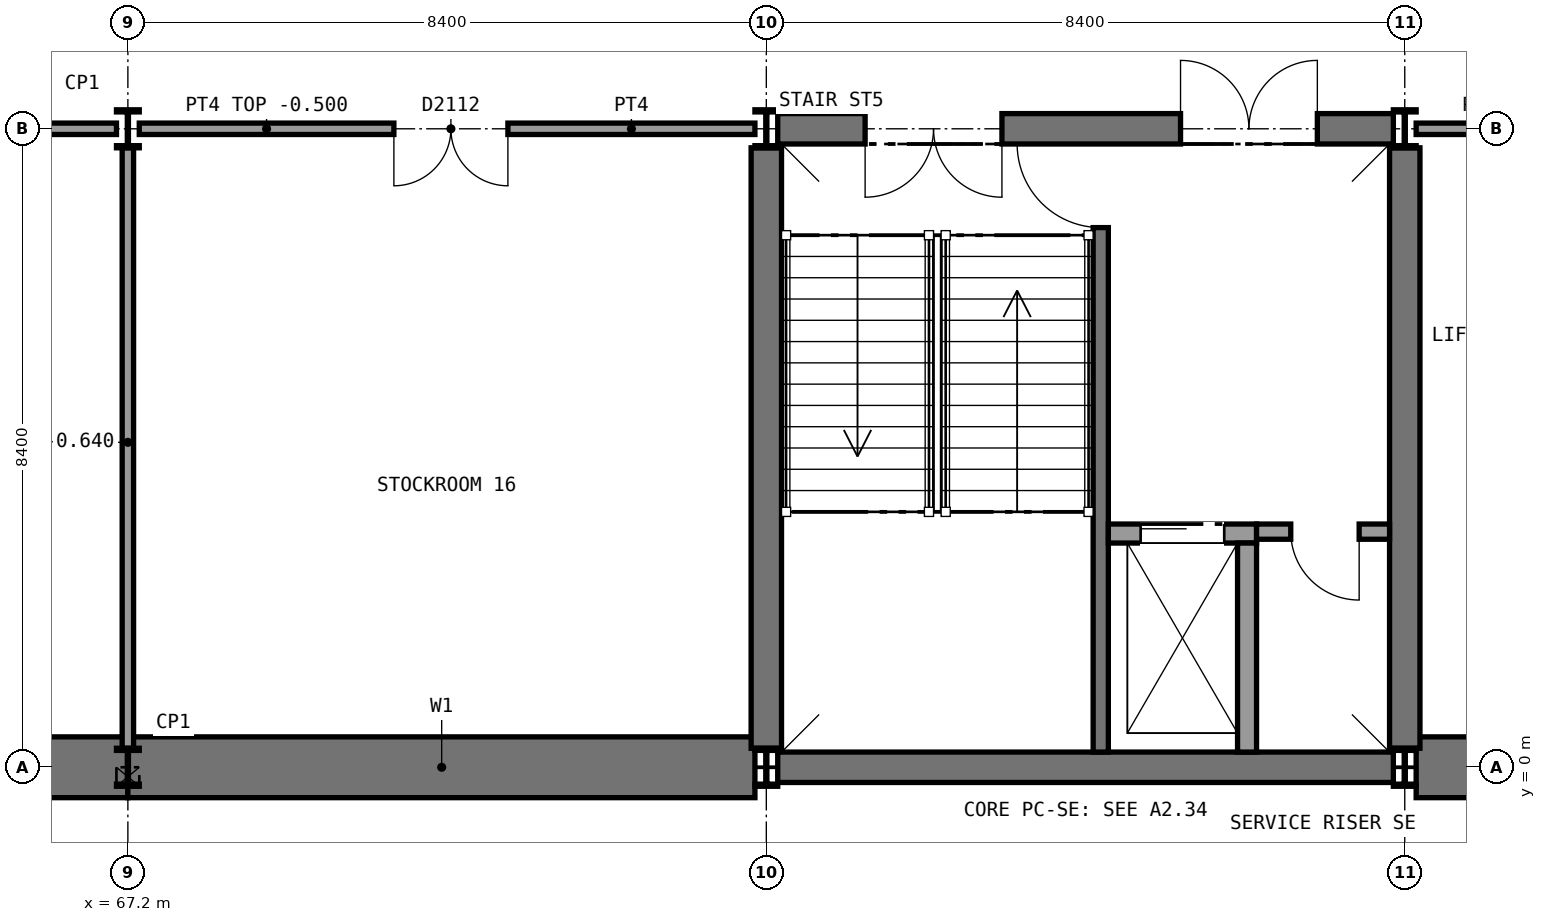
"""IFC4 building model, lengths in metres.
Left out: names, types, materials, properties, quantities, classifications, styles, units other than length and angle.
Written with IfcOpenShell. Run it as: python <this file> out.ifc"""

import sys

from ifc_helpers import new_model, si_unit, direction, frame, frame_2d, origin, origin_2d, place, context, subcontext, project, spatial, rectangle, i_section, extrude, element, fill, save


model = new_model("IFC4")
c1 = context("Model", 3, precision=1e-05, world=origin(), true_north=direction((0.0, 1.0)))
c2 = subcontext(c1, "Body", "Model", "MODEL_VIEW")
j1 = project(units=[si_unit("LENGTHUNIT", "METRE"), si_unit("PLANEANGLEUNIT", "RADIAN")], contexts=[c1])
p1 = place(None, origin())
s1 = spatial("IfcSite", under=j1, at=p1, CompositionType="ELEMENT")
p2 = place(p1, origin())
s2 = spatial("IfcBuilding", under=s1, at=p2, CompositionType="ELEMENT")
p3 = place(p2, frame((0.0, 0.0, -4.9)))
s3 = spatial("IfcBuildingStorey", under=s2, at=p3, CompositionType="ELEMENT", Elevation=-4.9)
p4 = place(p3, frame((58.95, 0.0, 0.0), z_axis=(0.0, 0.0, 1.0), x_axis=(1.0, 0.0, 0.0)))
e1 = element("IfcWall", 1, at=p4, inside=s3, PredefinedType="SOLIDWALL", context=c2, shape_type="SweptSolid", body=[
    extrude(rectangle(XDim=8.25, YDim=0.8, at=frame_2d((4.125, 0.0))), origin(), (0.0, 0.0, 1.0), 4.75),
])
p5 = place(p3, frame((67.2, 0.0, 0.0), z_axis=(0.0, 0.0, 1.0), x_axis=(1.0, 0.0, 0.0)))
e2 = element("IfcWall", 2, at=p5, inside=s3, PredefinedType="SOLIDWALL", context=c2, shape_type="SweptSolid", body=[
    extrude(rectangle(XDim=8.25, YDim=0.8, at=frame_2d((4.125, 0.0))), origin(), (0.0, 0.0, 1.0), 4.75),
])
p6 = place(p3, frame((84.15, 0.0, 0.0), z_axis=(0.0, 0.0, 1.0), x_axis=(1.0, 0.0, 0.0)))
e3 = element("IfcWall", 3, at=p6, inside=s3, PredefinedType="SOLIDWALL", context=c2, shape_type="SweptSolid", body=[
    extrude(rectangle(XDim=8.25, YDim=0.8, at=frame_2d((4.125, 0.0))), origin(), (0.0, 0.0, 1.0), 4.75),
])
p7 = place(p3, frame((75.75, 0.0, 0.0), z_axis=(0.0, 0.0, 1.0), x_axis=(1.0, 0.0, 0.0)))
e4 = element("IfcWall", 4, at=p7, inside=s3, PredefinedType="SHEAR", context=c2, shape_type="SweptSolid", body=[
    extrude(rectangle(XDim=8.1, YDim=0.4, at=frame_2d((4.05, 0.0))), origin(), (0.0, 0.0, 1.0), 4.75),
])
p8 = place(p3, frame((75.75, 8.4, 0.0), z_axis=(0.0, 0.0, 1.0), x_axis=(1.0, 0.0, 0.0)))
e5 = element("IfcWall", 5, at=p8, inside=s3, PredefinedType="SHEAR", context=c2, shape_type="SweptSolid", body=[
    extrude(rectangle(XDim=8.1, YDim=0.4, at=frame_2d((4.05, 0.0))), origin(), (0.0, 0.0, 1.0), 4.75),
])
p9 = place(p8, frame((1.15, 0.0, 0.0)))
e6 = element("IfcOpeningElement", 6, at=p9, cuts=e5, PredefinedType="OPENING", context=c2, shape_type="SweptSolid", body=[
    extrude(rectangle(XDim=1.8, YDim=2.1, at=frame_2d((0.9, 1.05))), frame((0.0, 0.21, 0.0), z_axis=(0.0, -1.0, 0.0), x_axis=(1.0, 0.0, 0.0)), (0.0, 0.0, 1.0), 0.42),
])
p10 = place(p8, frame((5.3, 0.0, 0.0)))
e7 = element("IfcOpeningElement", 7, at=p10, cuts=e5, PredefinedType="OPENING", context=c2, shape_type="SweptSolid", body=[
    extrude(rectangle(XDim=1.8, YDim=2.1, at=frame_2d((0.9, 1.05))), frame((0.0, 0.21, 0.0), z_axis=(0.0, -1.0, 0.0), x_axis=(1.0, 0.0, 0.0)), (0.0, 0.0, 1.0), 0.42),
])
for number, where, z_axis, x_axis in (
    (8, (75.6, 0.25, 0.0), (0.0, 0.0, 1.0), (0.0, 1.0, 0.0)),
    (9, (84.0, 0.25, 0.0), (0.0, 0.0, 1.0), (0.0, 1.0, 0.0)),
):
    element("IfcWall", number, at=place(p3, frame(where, z_axis=z_axis, x_axis=x_axis)), inside=s3, PredefinedType="SHEAR", context=c2, shape_type="SweptSolid", body=[
        extrude(rectangle(XDim=7.9, YDim=0.4, at=frame_2d((3.95, 0.0))), origin(), (0.0, 0.0, 1.0), 4.75),
    ])
for number, where, z_axis, x_axis in (
    (10, (67.2, 0.0, 0.0), (0.0, 0.0, 1.0), (1.0, 0.0, 0.0)),
    (11, (67.2, 8.4, 0.0), (0.0, 0.0, 1.0), (1.0, 0.0, 0.0)),
    (12, (75.6, 0.0, 0.0), (0.0, 0.0, 1.0), (1.0, 0.0, 0.0)),
    (13, (75.6, 8.4, 0.0), (0.0, 0.0, 1.0), (1.0, 0.0, 0.0)),
    (14, (84.0, 0.0, 0.0), (0.0, 0.0, 1.0), (1.0, 0.0, 0.0)),
    (15, (84.0, 8.4, 0.0), (0.0, 0.0, 1.0), (1.0, 0.0, 0.0)),
):
    element("IfcColumn", number, at=place(p3, frame(where, z_axis=z_axis, x_axis=x_axis)), inside=s3, PredefinedType="COLUMN", context=c2, shape_type="SweptSolid", body=[
        extrude(i_section(OverallWidth=0.3, OverallDepth=0.5, WebThickness=0.014, FlangeThickness=0.028, FilletRadius=0.027, at=origin_2d()), origin(), (0.0, 0.0, 1.0), 4.9),
    ])
p11 = place(p3, frame((58.95, 8.4, 0.0), z_axis=(0.0, 0.0, 1.0), x_axis=(1.0, 0.0, 0.0)))
e16 = element("IfcWall", 16, at=p11, inside=s3, PredefinedType="SOLIDWALL", context=c2, shape_type="SweptSolid", body=[
    extrude(rectangle(XDim=8.1, YDim=0.15, at=frame_2d((4.05, 0.0))), origin(), (0.0, 0.0, 1.0), 4.4),
])
p12 = place(p11, frame((3.35, 0.0, 0.0)))
e17 = element("IfcOpeningElement", 17, at=p12, cuts=e16, PredefinedType="OPENING", context=c2, shape_type="SweptSolid", body=[
    extrude(rectangle(XDim=1.5, YDim=2.1, at=frame_2d((0.75, 1.05))), frame((0.0, 0.085, 0.0), z_axis=(0.0, -1.0, 0.0), x_axis=(1.0, 0.0, 0.0)), (0.0, 0.0, 1.0), 0.17),
])
p13 = place(p3, frame((67.35, 8.4, 0.0), z_axis=(0.0, 0.0, 1.0), x_axis=(1.0, 0.0, 0.0)))
e18 = element("IfcWall", 18, at=p13, inside=s3, PredefinedType="SOLIDWALL", context=c2, shape_type="SweptSolid", body=[
    extrude(rectangle(XDim=8.1, YDim=0.15, at=frame_2d((4.05, 0.0))), origin(), (0.0, 0.0, 1.0), 4.4),
])
p14 = place(p13, frame((3.35, 0.0, 0.0)))
e19 = element("IfcOpeningElement", 19, at=p14, cuts=e18, PredefinedType="OPENING", context=c2, shape_type="SweptSolid", body=[
    extrude(rectangle(XDim=1.5, YDim=2.1, at=frame_2d((0.75, 1.05))), frame((0.0, 0.085, 0.0), z_axis=(0.0, -1.0, 0.0), x_axis=(1.0, 0.0, 0.0)), (0.0, 0.0, 1.0), 0.17),
])
p15 = place(p3, frame((84.15, 8.4, 0.0), z_axis=(0.0, 0.0, 1.0), x_axis=(1.0, 0.0, 0.0)))
e20 = element("IfcWall", 20, at=p15, inside=s3, PredefinedType="SOLIDWALL", context=c2, shape_type="SweptSolid", body=[
    extrude(rectangle(XDim=8.1, YDim=0.15, at=frame_2d((4.05, 0.0))), origin(), (0.0, 0.0, 1.0), 4.4),
])
p16 = place(p15, frame((3.35, 0.0, 0.0)))
e21 = element("IfcOpeningElement", 21, at=p16, cuts=e20, PredefinedType="OPENING", context=c2, shape_type="SweptSolid", body=[
    extrude(rectangle(XDim=1.5, YDim=2.1, at=frame_2d((0.75, 1.05))), frame((0.0, 0.085, 0.0), z_axis=(0.0, -1.0, 0.0), x_axis=(1.0, 0.0, 0.0)), (0.0, 0.0, 1.0), 0.17),
])
p17 = place(p3, frame((67.2, 0.25, 0.0), z_axis=(0.0, 0.0, 1.0), x_axis=(0.0, 1.0, 0.0)))
e22 = element("IfcWall", 22, at=p17, inside=s3, PredefinedType="SOLIDWALL", context=c2, shape_type="SweptSolid", body=[
    extrude(rectangle(XDim=7.9, YDim=0.15, at=frame_2d((3.95, 0.0))), origin(), (0.0, 0.0, 1.0), 4.26),
])
p18 = place(p3, frame((80.0, 0.2, 0.0), z_axis=(0.0, 0.0, 1.0), x_axis=(0.0, 1.0, 0.0)))
e23 = element("IfcWall", 23, at=p18, inside=s3, PredefinedType="SHEAR", context=c2, shape_type="SweptSolid", body=[
    extrude(rectangle(XDim=8.0, YDim=0.2, at=frame_2d((4.0, 0.0))), origin(), (0.0, 0.0, 1.0), 4.75),
])
p19 = place(p18, frame((6.9, 0.0, 0.0)))
e24 = element("IfcOpeningElement", 24, at=p19, cuts=e23, PredefinedType="OPENING", context=c2, shape_type="SweptSolid", body=[
    extrude(rectangle(XDim=1.11, YDim=2.1, at=frame_2d((0.555, 1.05))), frame((0.0, 0.11, 0.0), z_axis=(0.0, -1.0, 0.0), x_axis=(1.0, 0.0, 0.0)), (0.0, 0.0, 1.0), 0.22),
])
p20 = place(p3, frame((80.1, 3.075, 0.0), z_axis=(0.0, 0.0, 1.0), x_axis=(1.0, 0.0, 0.0)))
e25 = element("IfcWall", 25, at=p20, inside=s3, PredefinedType="SOLIDWALL", context=c2, shape_type="SweptSolid", body=[
    extrude(rectangle(XDim=1.95, YDim=0.25, at=frame_2d((0.975, 0.0))), origin(), (0.0, 0.0, 1.0), 4.9),
])
p21 = place(p20, frame((0.425, 0.0, 0.0)))
e26 = element("IfcOpeningElement", 26, at=p21, cuts=e25, PredefinedType="OPENING", context=c2, shape_type="SweptSolid", body=[
    extrude(rectangle(XDim=1.1, YDim=2.1, at=frame_2d((0.55, 1.05))), frame((0.0, 0.135, 0.0), z_axis=(0.0, -1.0, 0.0), x_axis=(1.0, 0.0, 0.0)), (0.0, 0.0, 1.0), 0.27),
])
p22 = place(p3, frame((81.925, 0.2, 0.0), z_axis=(0.0, 0.0, 1.0), x_axis=(0.0, 1.0, 0.0)))
e27 = element("IfcWall", 27, at=p22, inside=s3, PredefinedType="SOLIDWALL", context=c2, shape_type="SweptSolid", body=[
    extrude(rectangle(XDim=2.75, YDim=0.25, at=frame_2d((1.375, 0.0))), origin(), (0.0, 0.0, 1.0), 4.9),
])
p23 = place(p3, frame((82.05, 3.1, 0.0), z_axis=(0.0, 0.0, 1.0), x_axis=(1.0, 0.0, 0.0)))
e28 = element("IfcWall", 28, at=p23, inside=s3, PredefinedType="PARTITIONING", context=c2, shape_type="SweptSolid", body=[
    extrude(rectangle(XDim=1.75, YDim=0.2, at=frame_2d((0.875, 0.0))), origin(), (0.0, 0.0, 1.0), 4.75),
])
p24 = place(p23, frame((0.45, 0.0, 0.0)))
e29 = element("IfcOpeningElement", 29, at=p24, cuts=e28, PredefinedType="OPENING", context=c2, shape_type="SweptSolid", body=[
    extrude(rectangle(XDim=0.9, YDim=2.1, at=frame_2d((0.45, 1.05))), frame((0.0, 0.11, 0.0), z_axis=(0.0, -1.0, 0.0), x_axis=(1.0, 0.0, 0.0)), (0.0, 0.0, 1.0), 0.22),
])
p25 = place(p14, frame((1.5, 0.0, 0.0), z_axis=(0.0, 0.0, 1.0), x_axis=(-1.0, 0.0, 0.0)))
e30 = element("IfcDoor", 30, at=p25, inside=s3, OperationType="DOUBLE_DOOR_SINGLE_SWING", PredefinedType="DOOR", context=c2, shape_type="SweptSolid", body=[
    extrude(rectangle(XDim=1.5, YDim=2.1, at=frame_2d((0.75, 1.05))), frame((0.0, 0.025, 0.0), z_axis=(0.0, -1.0, 0.0), x_axis=(1.0, 0.0, 0.0)), (0.0, 0.0, 1.0), 0.05),
])
fill(e19, e30)
p26 = place(p19, origin())
e31 = element("IfcDoor", 31, at=p26, inside=s3, OperationType="SINGLE_SWING_RIGHT", PredefinedType="DOOR", context=c2, shape_type="SweptSolid", body=[
    extrude(rectangle(XDim=1.1, YDim=2.1, at=frame_2d((0.55, 1.05))), frame((0.0, 0.025, 0.0), z_axis=(0.0, -1.0, 0.0), x_axis=(1.0, 0.0, 0.0)), (0.0, 0.0, 1.0), 0.05),
])
fill(e24, e31)
p27 = place(p21, origin())
e32 = element("IfcDoor", 32, at=p27, inside=s3, OperationType="SLIDING_TO_LEFT", PredefinedType="DOOR", context=c2, shape_type="SweptSolid", body=[
    extrude(rectangle(XDim=1.1, YDim=2.1, at=frame_2d((0.55, 1.05))), frame((0.0, 0.025, 0.0), z_axis=(0.0, -1.0, 0.0), x_axis=(1.0, 0.0, 0.0)), (0.0, 0.0, 1.0), 0.05),
])
fill(e26, e32)
p28 = place(p24, frame((0.9, 0.0, 0.0), z_axis=(0.0, 0.0, 1.0), x_axis=(-1.0, 0.0, 0.0)))
e33 = element("IfcDoor", 33, at=p28, inside=s3, OperationType="SINGLE_SWING_LEFT", PredefinedType="DOOR", context=c2, shape_type="SweptSolid", body=[
    extrude(rectangle(XDim=0.9, YDim=2.1, at=frame_2d((0.45, 1.05))), frame((0.0, 0.025, 0.0), z_axis=(0.0, -1.0, 0.0), x_axis=(1.0, 0.0, 0.0)), (0.0, 0.0, 1.0), 0.05),
])
fill(e29, e33)
p29 = place(p9, frame((1.8, 0.0, 0.0), z_axis=(0.0, 0.0, 1.0), x_axis=(-1.0, 0.0, 0.0)))
e34 = element("IfcDoor", 34, at=p29, inside=s3, OperationType="DOUBLE_DOOR_SINGLE_SWING", PredefinedType="DOOR", context=c2, shape_type="SweptSolid", body=[
    extrude(rectangle(XDim=1.8, YDim=2.1, at=frame_2d((0.9, 1.05))), frame((0.0, 0.025, 0.0), z_axis=(0.0, -1.0, 0.0), x_axis=(1.0, 0.0, 0.0)), (0.0, 0.0, 1.0), 0.05),
])
fill(e6, e34)
p30 = place(p10, origin())
e35 = element("IfcDoor", 35, at=p30, inside=s3, OperationType="DOUBLE_DOOR_SINGLE_SWING", PredefinedType="DOOR", context=c2, shape_type="SweptSolid", body=[
    extrude(rectangle(XDim=1.8, YDim=2.1, at=frame_2d((0.9, 1.05))), frame((0.0, 0.025, 0.0), z_axis=(0.0, -1.0, 0.0), x_axis=(1.0, 0.0, 0.0)), (0.0, 0.0, 1.0), 0.05),
])
fill(e7, e35)
save(model, sys.argv[1])
